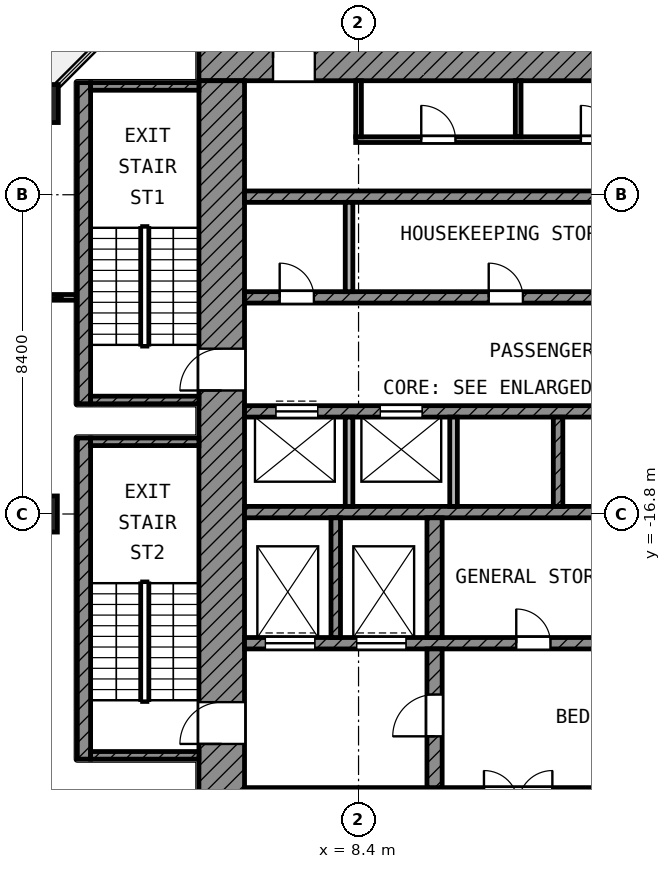
"""IFC4 building model, lengths in metres.
Left out: names, types, materials, properties, quantities, classifications, styles, units other than length and angle.
Written with IfcOpenShell. Run it as: python <this file> out.ifc"""

import sys

from ifc_helpers import new_model, si_unit, direction, frame, frame_2d, origin, origin_2d, place, context, subcontext, project, spatial, rectangle, extrude, element, fill, save


model = new_model("IFC4")
c1 = context("Model", 3, precision=1e-05, world=origin(), true_north=direction((0.0, 1.0)))
c2 = subcontext(c1, "Body", "Model", "MODEL_VIEW")
j1 = project(units=[si_unit("LENGTHUNIT", "METRE"), si_unit("PLANEANGLEUNIT", "RADIAN")], contexts=[c1])
p1 = place(None, origin())
s1 = spatial("IfcSite", under=j1, at=p1, CompositionType="ELEMENT")
p2 = place(p1, origin())
s2 = spatial("IfcBuilding", under=s1, at=p2, CompositionType="ELEMENT")
p3 = place(p2, frame((0.0, 0.0, 208.8)))
s3 = spatial("IfcBuildingStorey", under=s2, at=p3, CompositionType="ELEMENT", Elevation=208.8)
p4 = place(p3, frame((0.0, -6.0, 0.0), z_axis=(0.0, 0.0, 1.0), x_axis=(1.0, 0.0, 0.0)))
e1 = element("IfcColumn", 1, at=p4, inside=s3, PredefinedType="COLUMN", context=c2, shape_type="SweptSolid", body=[
    extrude(rectangle(XDim=1.0, YDim=1.0, at=origin_2d()), origin(), (0.0, 0.0, 1.0), 4.2),
])
p5 = place(p3, frame((0.0, -16.8, 0.0), z_axis=(0.0, 0.0, 1.0), x_axis=(1.0, 0.0, 0.0)))
e2 = element("IfcColumn", 2, at=p5, inside=s3, PredefinedType="COLUMN", context=c2, shape_type="SweptSolid", body=[
    extrude(rectangle(XDim=0.95, YDim=0.95, at=origin_2d()), origin(), (0.0, 0.0, 1.0), 4.2),
])
p6 = place(p3, frame((4.2, -4.8, 0.0), z_axis=(0.0, 0.0, 1.0), x_axis=(1.0, 0.0, 0.0)))
e3 = element("IfcWall", 3, at=p6, inside=s3, PredefinedType="SHEAR", context=c2, shape_type="SweptSolid", body=[
    extrude(rectangle(XDim=20.7, YDim=1.2, at=frame_2d((10.35, 0.0))), origin(), (0.0, 0.0, 1.0), 3.7),
])
p7 = place(p6, frame((1.95, 0.0, 0.0)))
e4 = element("IfcOpeningElement", 4, at=p7, cuts=e3, PredefinedType="OPENING", context=c2, shape_type="SweptSolid", body=[
    extrude(rectangle(XDim=1.1, YDim=2.1, at=frame_2d((0.55, 1.05))), frame((0.0, 0.61, 0.0), z_axis=(0.0, -1.0, 0.0), x_axis=(1.0, 0.0, 0.0)), (0.0, 0.0, 1.0), 1.22),
])
p8 = place(p6, frame((17.95, 0.0, 0.0)))
e5 = element("IfcOpeningElement", 5, at=p8, cuts=e3, PredefinedType="OPENING", context=c2, shape_type="SweptSolid", body=[
    extrude(rectangle(XDim=1.1, YDim=2.1, at=frame_2d((0.55, 1.05))), frame((0.0, 0.61, 0.0), z_axis=(0.0, -1.0, 0.0), x_axis=(1.0, 0.0, 0.0)), (0.0, 0.0, 1.0), 1.22),
])
p9 = place(p3, frame((4.8, -24.9, 0.0), z_axis=(0.0, 0.0, 1.0), x_axis=(0.0, 1.0, 0.0)))
e6 = element("IfcWall", 6, at=p9, inside=s3, PredefinedType="SHEAR", context=c2, shape_type="SweptSolid", body=[
    extrude(rectangle(XDim=19.5, YDim=1.2, at=frame_2d((9.75, 0.0))), origin(), (0.0, 0.0, 1.0), 3.7),
])
p10 = place(p9, frame((11.35, 0.0, 0.0)))
e7 = element("IfcOpeningElement", 7, at=p10, cuts=e6, PredefinedType="OPENING", context=c2, shape_type="SweptSolid", body=[
    extrude(rectangle(XDim=1.1, YDim=2.1, at=frame_2d((0.55, 1.05))), frame((0.0, 0.61, 0.0), z_axis=(0.0, -1.0, 0.0), x_axis=(1.0, 0.0, 0.0)), (0.0, 0.0, 1.0), 1.22),
])
p11 = place(p9, frame((2.05, 0.0, 0.0)))
e8 = element("IfcOpeningElement", 8, at=p11, cuts=e6, PredefinedType="OPENING", context=c2, shape_type="SweptSolid", body=[
    extrude(rectangle(XDim=1.1, YDim=2.1, at=frame_2d((0.55, 1.05))), frame((0.0, 0.61, 0.0), z_axis=(0.0, -1.0, 0.0), x_axis=(1.0, 0.0, 0.0)), (0.0, 0.0, 1.0), 1.22),
])
p12 = place(p3, frame((5.4, -24.45, 0.0), z_axis=(0.0, 0.0, 1.0), x_axis=(1.0, 0.0, 0.0)))
e9 = element("IfcWall", 9, at=p12, inside=s3, PredefinedType="SHEAR", context=c2, shape_type="SweptSolid", body=[
    extrude(rectangle(XDim=18.6, YDim=0.9, at=frame_2d((9.3, 0.0))), origin(), (0.0, 0.0, 1.0), 3.7),
])
p13 = place(p12, frame((6.3, 0.0, 0.0)))
e10 = element("IfcOpeningElement", 10, at=p13, cuts=e9, PredefinedType="OPENING", context=c2, shape_type="SweptSolid", body=[
    extrude(rectangle(XDim=1.8, YDim=2.1, at=frame_2d((0.9, 1.05))), frame((0.0, 0.46, 0.0), z_axis=(0.0, -1.0, 0.0), x_axis=(1.0, 0.0, 0.0)), (0.0, 0.0, 1.0), 0.92),
])
p14 = place(p3, frame((5.4, -8.45, 0.0), z_axis=(0.0, 0.0, 1.0), x_axis=(1.0, 0.0, 0.0)))
e11 = element("IfcWall", 11, at=p14, inside=s3, PredefinedType="SHEAR", context=c2, shape_type="SweptSolid", body=[
    extrude(rectangle(XDim=16.65, YDim=0.3, at=frame_2d((8.325, 0.0))), origin(), (0.0, 0.0, 1.0), 3.7),
])
p15 = place(p3, frame((5.4, -11.1, 0.0), z_axis=(0.0, 0.0, 1.0), x_axis=(1.0, 0.0, 0.0)))
e12 = element("IfcWall", 12, at=p15, inside=s3, PredefinedType="SHEAR", context=c2, shape_type="SweptSolid", body=[
    extrude(rectangle(XDim=16.65, YDim=0.3, at=frame_2d((8.325, 0.0))), origin(), (0.0, 0.0, 1.0), 3.7),
])
p16 = place(p15, frame((11.825, 0.0, 0.0)))
e13 = element("IfcOpeningElement", 13, at=p16, cuts=e12, PredefinedType="OPENING", context=c2, shape_type="SweptSolid", body=[
    extrude(rectangle(XDim=1.1, YDim=2.1, at=frame_2d((0.55, 1.05))), frame((0.0, 0.16, 0.0), z_axis=(0.0, -1.0, 0.0), x_axis=(1.0, 0.0, 0.0)), (0.0, 0.0, 1.0), 0.32),
])
p17 = place(p15, frame((14.575, 0.0, 0.0)))
e14 = element("IfcOpeningElement", 14, at=p17, cuts=e12, PredefinedType="OPENING", context=c2, shape_type="SweptSolid", body=[
    extrude(rectangle(XDim=1.1, YDim=2.1, at=frame_2d((0.55, 1.05))), frame((0.0, 0.16, 0.0), z_axis=(0.0, -1.0, 0.0), x_axis=(1.0, 0.0, 0.0)), (0.0, 0.0, 1.0), 0.32),
])
p18 = place(p15, frame((0.925, 0.0, 0.0)))
e15 = element("IfcOpeningElement", 15, at=p18, cuts=e12, PredefinedType="OPENING", context=c2, shape_type="SweptSolid", body=[
    extrude(rectangle(XDim=0.9, YDim=2.1, at=frame_2d((0.45, 1.05))), frame((0.0, 0.16, 0.0), z_axis=(0.0, -1.0, 0.0), x_axis=(1.0, 0.0, 0.0)), (0.0, 0.0, 1.0), 0.32),
])
p19 = place(p15, frame((6.425, 0.0, 0.0)))
e16 = element("IfcOpeningElement", 16, at=p19, cuts=e12, PredefinedType="OPENING", context=c2, shape_type="SweptSolid", body=[
    extrude(rectangle(XDim=0.9, YDim=2.1, at=frame_2d((0.45, 1.05))), frame((0.0, 0.16, 0.0), z_axis=(0.0, -1.0, 0.0), x_axis=(1.0, 0.0, 0.0)), (0.0, 0.0, 1.0), 0.32),
])
p20 = place(p3, frame((5.4, -14.1, 0.0), z_axis=(0.0, 0.0, 1.0), x_axis=(1.0, 0.0, 0.0)))
e17 = element("IfcWall", 17, at=p20, inside=s3, PredefinedType="SHEAR", context=c2, shape_type="SweptSolid", body=[
    extrude(rectangle(XDim=16.65, YDim=0.3, at=frame_2d((8.325, 0.0))), origin(), (0.0, 0.0, 1.0), 3.7),
])
p21 = place(p20, frame((0.825, 0.0, 0.0)))
e18 = element("IfcOpeningElement", 18, at=p21, cuts=e17, PredefinedType="OPENING", context=c2, shape_type="SweptSolid", body=[
    extrude(rectangle(XDim=1.1, YDim=2.1, at=frame_2d((0.55, 1.05))), frame((0.0, 0.16, 0.0), z_axis=(0.0, -1.0, 0.0), x_axis=(1.0, 0.0, 0.0)), (0.0, 0.0, 1.0), 0.32),
])
p22 = place(p20, frame((3.575, 0.0, 0.0)))
e19 = element("IfcOpeningElement", 19, at=p22, cuts=e17, PredefinedType="OPENING", context=c2, shape_type="SweptSolid", body=[
    extrude(rectangle(XDim=1.1, YDim=2.1, at=frame_2d((0.55, 1.05))), frame((0.0, 0.16, 0.0), z_axis=(0.0, -1.0, 0.0), x_axis=(1.0, 0.0, 0.0)), (0.0, 0.0, 1.0), 0.32),
])
p23 = place(p3, frame((5.4, -16.75, 0.0), z_axis=(0.0, 0.0, 1.0), x_axis=(1.0, 0.0, 0.0)))
e20 = element("IfcWall", 20, at=p23, inside=s3, PredefinedType="SHEAR", context=c2, shape_type="SweptSolid", body=[
    extrude(rectangle(XDim=16.65, YDim=0.3, at=frame_2d((8.325, 0.0))), origin(), (0.0, 0.0, 1.0), 3.7),
])
p24 = place(p3, frame((5.4, -20.2, 0.0), z_axis=(0.0, 0.0, 1.0), x_axis=(1.0, 0.0, 0.0)))
e21 = element("IfcWall", 21, at=p24, inside=s3, PredefinedType="SHEAR", context=c2, shape_type="SweptSolid", body=[
    extrude(rectangle(XDim=14.65, YDim=0.3, at=frame_2d((7.325, 0.0))), origin(), (0.0, 0.0, 1.0), 3.7),
])
p25 = place(p24, frame((10.55, 0.0, 0.0)))
e22 = element("IfcOpeningElement", 22, at=p25, cuts=e21, PredefinedType="OPENING", context=c2, shape_type="SweptSolid", body=[
    extrude(rectangle(XDim=1.3, YDim=2.1, at=frame_2d((0.65, 1.05))), frame((0.0, 0.16, 0.0), z_axis=(0.0, -1.0, 0.0), x_axis=(1.0, 0.0, 0.0)), (0.0, 0.0, 1.0), 0.32),
])
p26 = place(p24, frame((12.95, 0.0, 0.0)))
e23 = element("IfcOpeningElement", 23, at=p26, cuts=e21, PredefinedType="OPENING", context=c2, shape_type="SweptSolid", body=[
    extrude(rectangle(XDim=1.3, YDim=2.1, at=frame_2d((0.65, 1.05))), frame((0.0, 0.16, 0.0), z_axis=(0.0, -1.0, 0.0), x_axis=(1.0, 0.0, 0.0)), (0.0, 0.0, 1.0), 0.32),
])
p27 = place(p24, frame((0.55, 0.0, 0.0)))
e24 = element("IfcOpeningElement", 24, at=p27, cuts=e21, PredefinedType="OPENING", context=c2, shape_type="SweptSolid", body=[
    extrude(rectangle(XDim=1.3, YDim=2.1, at=frame_2d((0.65, 1.05))), frame((0.0, 0.16, 0.0), z_axis=(0.0, -1.0, 0.0), x_axis=(1.0, 0.0, 0.0)), (0.0, 0.0, 1.0), 0.32),
])
p28 = place(p24, frame((2.95, 0.0, 0.0)))
e25 = element("IfcOpeningElement", 25, at=p28, cuts=e21, PredefinedType="OPENING", context=c2, shape_type="SweptSolid", body=[
    extrude(rectangle(XDim=1.3, YDim=2.1, at=frame_2d((0.65, 1.05))), frame((0.0, 0.16, 0.0), z_axis=(0.0, -1.0, 0.0), x_axis=(1.0, 0.0, 0.0)), (0.0, 0.0, 1.0), 0.32),
])
p29 = place(p24, frame((7.15, 0.0, 0.0)))
e26 = element("IfcOpeningElement", 26, at=p29, cuts=e21, PredefinedType="OPENING", context=c2, shape_type="SweptSolid", body=[
    extrude(rectangle(XDim=0.9, YDim=2.1, at=frame_2d((0.45, 1.05))), frame((0.0, 0.16, 0.0), z_axis=(0.0, -1.0, 0.0), x_axis=(1.0, 0.0, 0.0)), (0.0, 0.0, 1.0), 0.32),
])
p30 = place(p3, frame((10.4, -24.0, 0.0), z_axis=(0.0, 0.0, 1.0), x_axis=(0.0, 1.0, 0.0)))
e27 = element("IfcWall", 27, at=p30, inside=s3, PredefinedType="SHEAR", context=c2, shape_type="SweptSolid", body=[
    extrude(rectangle(XDim=3.65, YDim=0.4, at=frame_2d((1.825, 0.0))), origin(), (0.0, 0.0, 1.0), 3.7),
])
p31 = place(p30, frame((1.35, 0.0, 0.0)))
e28 = element("IfcOpeningElement", 28, at=p31, cuts=e27, PredefinedType="OPENING", context=c2, shape_type="SweptSolid", body=[
    extrude(rectangle(XDim=1.1, YDim=2.1, at=frame_2d((0.55, 1.05))), frame((0.0, 0.21, 0.0), z_axis=(0.0, -1.0, 0.0), x_axis=(1.0, 0.0, 0.0)), (0.0, 0.0, 1.0), 0.42),
])
p32 = place(p3, frame((10.4, -20.05, 0.0), z_axis=(0.0, 0.0, 1.0), x_axis=(0.0, 1.0, 0.0)))
e29 = element("IfcWall", 29, at=p32, inside=s3, PredefinedType="SHEAR", context=c2, shape_type="SweptSolid", body=[
    extrude(rectangle(XDim=3.15, YDim=0.4, at=frame_2d((1.575, 0.0))), origin(), (0.0, 0.0, 1.0), 3.7),
])
p33 = place(p3, frame((7.8, -20.05, 0.0), z_axis=(0.0, 0.0, 1.0), x_axis=(0.0, 1.0, 0.0)))
e30 = element("IfcWall", 30, at=p33, inside=s3, PredefinedType="SHEAR", context=c2, shape_type="SweptSolid", body=[
    extrude(rectangle(XDim=3.15, YDim=0.25, at=frame_2d((1.575, 0.0))), origin(), (0.0, 0.0, 1.0), 3.7),
])
p34 = place(p3, frame((8.15, -10.95, 0.0), z_axis=(0.0, 0.0, 1.0), x_axis=(0.0, 1.0, 0.0)))
e31 = element("IfcWall", 31, at=p34, inside=s3, PredefinedType="PARTITIONING", context=c2, shape_type="SweptSolid", body=[
    extrude(rectangle(XDim=2.35, YDim=0.2, at=frame_2d((1.175, 0.0))), origin(), (0.0, 0.0, 1.0), 3.7),
])
for number, where, z_axis, x_axis in (
    (32, (8.15, -16.6, 0.0), (0.0, 0.0, 1.0), (0.0, 1.0, 0.0)),
    (33, (10.9, -16.6, 0.0), (0.0, 0.0, 1.0), (0.0, 1.0, 0.0)),
):
    element("IfcWall", number, at=place(p3, frame(where, z_axis=z_axis, x_axis=x_axis)), inside=s3, PredefinedType="PARTITIONING", context=c2, shape_type="SweptSolid", body=[
        extrude(rectangle(XDim=2.35, YDim=0.2, at=frame_2d((1.175, 0.0))), origin(), (0.0, 0.0, 1.0), 3.7),
    ])
p35 = place(p3, frame((13.65, -16.6, 0.0), z_axis=(0.0, 0.0, 1.0), x_axis=(0.0, 1.0, 0.0)))
e34 = element("IfcWall", 34, at=p35, inside=s3, PredefinedType="SHEAR", context=c2, shape_type="SweptSolid", body=[
    extrude(rectangle(XDim=2.35, YDim=0.25, at=frame_2d((1.175, 0.0))), origin(), (0.0, 0.0, 1.0), 3.7),
])
p36 = place(p3, frame((8.325, -6.95, 0.0), z_axis=(0.0, 0.0, 1.0), x_axis=(1.0, 0.0, 0.0)))
e35 = element("IfcWall", 35, at=p36, inside=s3, PredefinedType="PARTITIONING", context=c2, shape_type="SweptSolid", body=[
    extrude(rectangle(XDim=12.75, YDim=0.15, at=frame_2d((6.375, 0.0))), origin(), (0.0, 0.0, 1.0), 3.7),
])
p37 = place(p36, frame((1.725, 0.0, 0.0)))
e36 = element("IfcOpeningElement", 36, at=p37, cuts=e35, PredefinedType="OPENING", context=c2, shape_type="SweptSolid", body=[
    extrude(rectangle(XDim=0.9, YDim=2.1, at=frame_2d((0.45, 1.05))), frame((0.0, 0.085, 0.0), z_axis=(0.0, -1.0, 0.0), x_axis=(1.0, 0.0, 0.0)), (0.0, 0.0, 1.0), 0.17),
])
p38 = place(p36, frame((5.925, 0.0, 0.0)))
e37 = element("IfcOpeningElement", 37, at=p38, cuts=e35, PredefinedType="OPENING", context=c2, shape_type="SweptSolid", body=[
    extrude(rectangle(XDim=0.9, YDim=2.1, at=frame_2d((0.45, 1.05))), frame((0.0, 0.085, 0.0), z_axis=(0.0, -1.0, 0.0), x_axis=(1.0, 0.0, 0.0)), (0.0, 0.0, 1.0), 0.17),
])
p39 = place(p36, frame((10.125, 0.0, 0.0)))
e38 = element("IfcOpeningElement", 38, at=p39, cuts=e35, PredefinedType="OPENING", context=c2, shape_type="SweptSolid", body=[
    extrude(rectangle(XDim=0.9, YDim=2.1, at=frame_2d((0.45, 1.05))), frame((0.0, 0.085, 0.0), z_axis=(0.0, -1.0, 0.0), x_axis=(1.0, 0.0, 0.0)), (0.0, 0.0, 1.0), 0.17),
])
for number, where, z_axis, x_axis in (
    (39, (8.4, -6.875, 0.0), (0.0, 0.0, 1.0), (0.0, 1.0, 0.0)),
    (40, (12.6, -6.875, 0.0), (0.0, 0.0, 1.0), (0.0, 1.0, 0.0)),
):
    element("IfcWall", number, at=place(p3, frame(where, z_axis=z_axis, x_axis=x_axis)), inside=s3, PredefinedType="PARTITIONING", context=c2, shape_type="SweptSolid", body=[
        extrude(rectangle(XDim=1.475, YDim=0.15, at=frame_2d((0.738, 0.0))), origin(), (0.0, 0.0, 1.0), 3.7),
    ])
p40 = place(p3, frame((1.175, -13.9, 0.0), z_axis=(0.0, 0.0, 1.0), x_axis=(0.0, 1.0, 0.0)))
e41 = element("IfcWall", 41, at=p40, inside=s3, PredefinedType="SHEAR", context=c2, shape_type="SweptSolid", body=[
    extrude(rectangle(XDim=8.45, YDim=0.35, at=frame_2d((4.225, 0.0))), origin(), (0.0, 0.0, 1.0), 3.7),
])
for number, where, z_axis, x_axis in (
    (42, (1.35, -5.55, 0.0), (0.0, 0.0, 1.0), (1.0, 0.0, 0.0)),
    (43, (1.35, -13.8, 0.0), (0.0, 0.0, 1.0), (1.0, 0.0, 0.0)),
):
    element("IfcWall", number, at=place(p3, frame(where, z_axis=z_axis, x_axis=x_axis)), inside=s3, PredefinedType="SHEAR", context=c2, shape_type="SweptSolid", body=[
        extrude(rectangle(XDim=2.85, YDim=0.2, at=frame_2d((1.425, 0.0))), origin(), (0.0, 0.0, 1.0), 3.7),
    ])
p41 = place(p3, frame((1.175, -23.25, 0.0), z_axis=(0.0, 0.0, 1.0), x_axis=(0.0, 1.0, 0.0)))
e44 = element("IfcWall", 44, at=p41, inside=s3, PredefinedType="SHEAR", context=c2, shape_type="SweptSolid", body=[
    extrude(rectangle(XDim=8.45, YDim=0.35, at=frame_2d((4.225, 0.0))), origin(), (0.0, 0.0, 1.0), 3.7),
])
for number, where, z_axis, x_axis in (
    (45, (1.35, -14.9, 0.0), (0.0, 0.0, 1.0), (1.0, 0.0, 0.0)),
    (46, (1.35, -23.15, 0.0), (0.0, 0.0, 1.0), (1.0, 0.0, 0.0)),
):
    element("IfcWall", number, at=place(p3, frame(where, z_axis=z_axis, x_axis=x_axis)), inside=s3, PredefinedType="SHEAR", context=c2, shape_type="SweptSolid", body=[
        extrude(rectangle(XDim=2.85, YDim=0.2, at=frame_2d((1.425, 0.0))), origin(), (0.0, 0.0, 1.0), 3.7),
    ])
p42 = place(p3, frame((0.08, -11.1, 0.0), z_axis=(0.0, 0.0, 1.0), x_axis=(1.0, 0.0, 0.0)))
e47 = element("IfcWall", 47, at=p42, inside=s3, PredefinedType="PARTITIONING", context=c2, shape_type="SweptSolid", body=[
    extrude(rectangle(XDim=0.89, YDim=0.15, at=frame_2d((0.445, 0.0))), origin(), (0.0, 0.0, 1.0), 3.7),
])
p43 = place(p21, origin())
e48 = element("IfcDoor", 48, at=p43, inside=s3, OperationType="DOUBLE_DOOR_SLIDING", PredefinedType="DOOR", context=c2, shape_type="SweptSolid", body=[
    extrude(rectangle(XDim=1.1, YDim=2.1, at=frame_2d((0.55, 1.05))), frame((0.0, 0.025, 0.0), z_axis=(0.0, -1.0, 0.0), x_axis=(1.0, 0.0, 0.0)), (0.0, 0.0, 1.0), 0.05),
])
fill(e18, e48)
p44 = place(p22, origin())
e49 = element("IfcDoor", 49, at=p44, inside=s3, OperationType="DOUBLE_DOOR_SLIDING", PredefinedType="DOOR", context=c2, shape_type="SweptSolid", body=[
    extrude(rectangle(XDim=1.1, YDim=2.1, at=frame_2d((0.55, 1.05))), frame((0.0, 0.025, 0.0), z_axis=(0.0, -1.0, 0.0), x_axis=(1.0, 0.0, 0.0)), (0.0, 0.0, 1.0), 0.05),
])
fill(e19, e49)
p45 = place(p27, origin())
e50 = element("IfcDoor", 50, at=p45, inside=s3, OperationType="DOUBLE_DOOR_SLIDING", PredefinedType="DOOR", context=c2, shape_type="SweptSolid", body=[
    extrude(rectangle(XDim=1.3, YDim=2.1, at=frame_2d((0.65, 1.05))), frame((0.0, 0.025, 0.0), z_axis=(0.0, -1.0, 0.0), x_axis=(1.0, 0.0, 0.0)), (0.0, 0.0, 1.0), 0.05),
])
fill(e24, e50)
p46 = place(p28, origin())
e51 = element("IfcDoor", 51, at=p46, inside=s3, OperationType="DOUBLE_DOOR_SLIDING", PredefinedType="DOOR", context=c2, shape_type="SweptSolid", body=[
    extrude(rectangle(XDim=1.3, YDim=2.1, at=frame_2d((0.65, 1.05))), frame((0.0, 0.025, 0.0), z_axis=(0.0, -1.0, 0.0), x_axis=(1.0, 0.0, 0.0)), (0.0, 0.0, 1.0), 0.05),
])
fill(e25, e51)
p47 = place(p10, origin())
e52 = element("IfcDoor", 52, at=p47, inside=s3, OperationType="SINGLE_SWING_LEFT", PredefinedType="DOOR", context=c2, shape_type="SweptSolid", body=[
    extrude(rectangle(XDim=1.1, YDim=2.1, at=frame_2d((0.55, 1.05))), frame((0.0, 0.025, 0.0), z_axis=(0.0, -1.0, 0.0), x_axis=(1.0, 0.0, 0.0)), (0.0, 0.0, 1.0), 0.05),
])
fill(e7, e52)
p48 = place(p11, origin())
e53 = element("IfcDoor", 53, at=p48, inside=s3, OperationType="SINGLE_SWING_LEFT", PredefinedType="DOOR", context=c2, shape_type="SweptSolid", body=[
    extrude(rectangle(XDim=1.1, YDim=2.1, at=frame_2d((0.55, 1.05))), frame((0.0, 0.025, 0.0), z_axis=(0.0, -1.0, 0.0), x_axis=(1.0, 0.0, 0.0)), (0.0, 0.0, 1.0), 0.05),
])
fill(e8, e53)
p49 = place(p7, origin())
e54 = element("IfcDoor", 54, at=p49, inside=s3, OperationType="SINGLE_SWING_LEFT", PredefinedType="DOOR", context=c2, shape_type="SweptSolid", body=[
    extrude(rectangle(XDim=1.1, YDim=2.1, at=frame_2d((0.55, 1.05))), frame((0.0, 0.025, 0.0), z_axis=(0.0, -1.0, 0.0), x_axis=(1.0, 0.0, 0.0)), (0.0, 0.0, 1.0), 0.05),
])
fill(e4, e54)
p50 = place(p31, origin())
e55 = element("IfcDoor", 55, at=p50, inside=s3, OperationType="SINGLE_SWING_LEFT", PredefinedType="DOOR", context=c2, shape_type="SweptSolid", body=[
    extrude(rectangle(XDim=1.1, YDim=2.1, at=frame_2d((0.55, 1.05))), frame((0.0, 0.025, 0.0), z_axis=(0.0, -1.0, 0.0), x_axis=(1.0, 0.0, 0.0)), (0.0, 0.0, 1.0), 0.05),
])
fill(e28, e55)
p51 = place(p37, origin())
e56 = element("IfcDoor", 56, at=p51, inside=s3, OperationType="SINGLE_SWING_LEFT", PredefinedType="DOOR", context=c2, shape_type="SweptSolid", body=[
    extrude(rectangle(XDim=0.9, YDim=2.1, at=frame_2d((0.45, 1.05))), frame((0.0, 0.025, 0.0), z_axis=(0.0, -1.0, 0.0), x_axis=(1.0, 0.0, 0.0)), (0.0, 0.0, 1.0), 0.05),
])
fill(e36, e56)
p52 = place(p38, origin())
e57 = element("IfcDoor", 57, at=p52, inside=s3, OperationType="SINGLE_SWING_LEFT", PredefinedType="DOOR", context=c2, shape_type="SweptSolid", body=[
    extrude(rectangle(XDim=0.9, YDim=2.1, at=frame_2d((0.45, 1.05))), frame((0.0, 0.025, 0.0), z_axis=(0.0, -1.0, 0.0), x_axis=(1.0, 0.0, 0.0)), (0.0, 0.0, 1.0), 0.05),
])
fill(e37, e57)
p53 = place(p29, origin())
e58 = element("IfcDoor", 58, at=p53, inside=s3, OperationType="SINGLE_SWING_LEFT", PredefinedType="DOOR", context=c2, shape_type="SweptSolid", body=[
    extrude(rectangle(XDim=0.9, YDim=2.1, at=frame_2d((0.45, 1.05))), frame((0.0, 0.025, 0.0), z_axis=(0.0, -1.0, 0.0), x_axis=(1.0, 0.0, 0.0)), (0.0, 0.0, 1.0), 0.05),
])
fill(e26, e58)
p54 = place(p18, origin())
e59 = element("IfcDoor", 59, at=p54, inside=s3, OperationType="SINGLE_SWING_LEFT", PredefinedType="DOOR", context=c2, shape_type="SweptSolid", body=[
    extrude(rectangle(XDim=0.9, YDim=2.1, at=frame_2d((0.45, 1.05))), frame((0.0, 0.025, 0.0), z_axis=(0.0, -1.0, 0.0), x_axis=(1.0, 0.0, 0.0)), (0.0, 0.0, 1.0), 0.05),
])
fill(e15, e59)
p55 = place(p19, origin())
e60 = element("IfcDoor", 60, at=p55, inside=s3, OperationType="SINGLE_SWING_LEFT", PredefinedType="DOOR", context=c2, shape_type="SweptSolid", body=[
    extrude(rectangle(XDim=0.9, YDim=2.1, at=frame_2d((0.45, 1.05))), frame((0.0, 0.025, 0.0), z_axis=(0.0, -1.0, 0.0), x_axis=(1.0, 0.0, 0.0)), (0.0, 0.0, 1.0), 0.05),
])
fill(e16, e60)
save(model, sys.argv[1])
